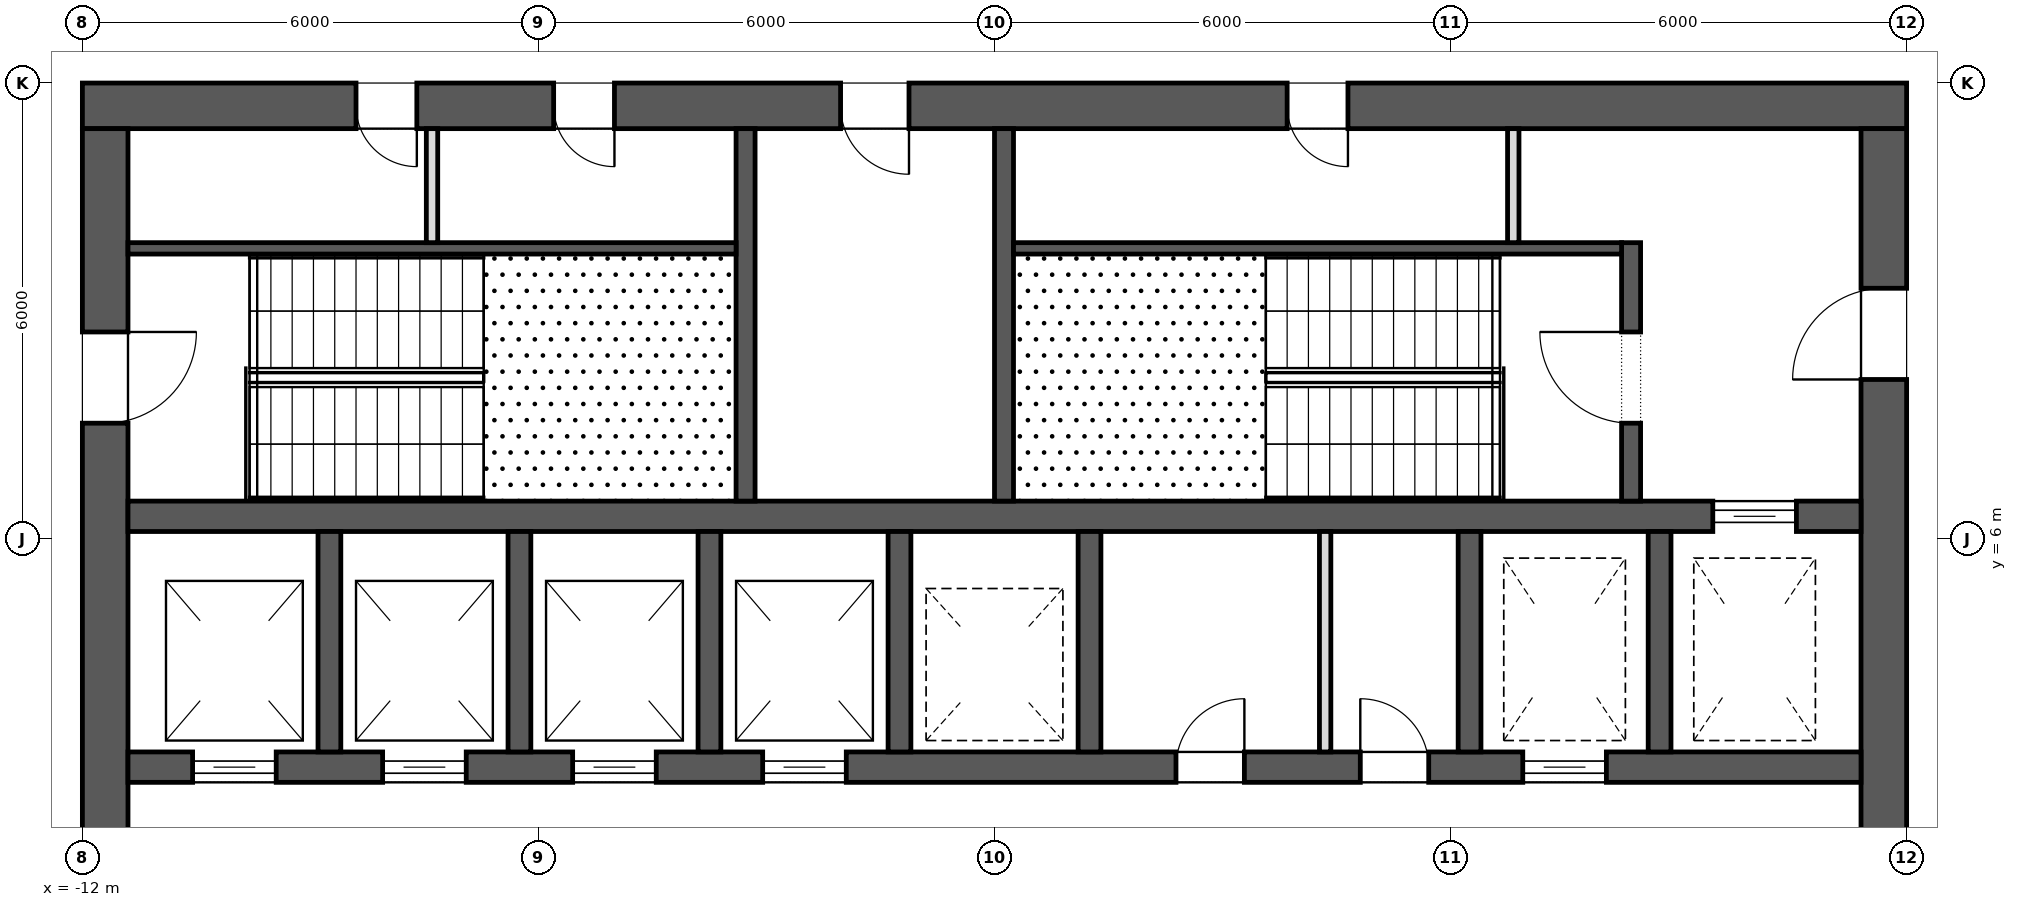
"""IFC4 building model, lengths in metres.
Left out: names, types, materials, properties, quantities, classifications, styles, units other than length and angle.
Written with IfcOpenShell. Run it as: python <this file> out.ifc"""

import sys

from ifc_helpers import new_model, si_unit, direction, frame, frame_2d, origin, place, context, subcontext, project, spatial, rectangle, extrude, element, fill, save


model = new_model("IFC4")
c1 = context("Model", 3, precision=1e-05, world=origin(), true_north=direction((0.0, 1.0)))
c2 = subcontext(c1, "Body", "Model", "MODEL_VIEW")
j1 = project(units=[si_unit("LENGTHUNIT", "METRE"), si_unit("PLANEANGLEUNIT", "RADIAN")], contexts=[c1])
p1 = place(None, origin())
s1 = spatial("IfcSite", under=j1, at=p1, CompositionType="ELEMENT")
p2 = place(p1, origin())
s2 = spatial("IfcBuilding", under=s1, at=p2, CompositionType="ELEMENT")
p3 = place(p2, frame((0.0, 0.0, 238.9)))
s3 = spatial("IfcBuildingStorey", under=s2, at=p3, CompositionType="ELEMENT", Elevation=238.9)
p4 = place(p3, frame((-12.0, 11.7, 0.0), z_axis=(0.0, 0.0, 1.0), x_axis=(1.0, 0.0, 0.0)))
e1 = element("IfcWall", 1, at=p4, inside=s3, PredefinedType="SHEAR", context=c2, shape_type="SweptSolid", body=[
    extrude(rectangle(XDim=24.0, YDim=0.6, at=frame_2d((12.0, 0.0))), origin(), (0.0, 0.0, 1.0), 4.0),
])
p5 = place(p4, frame((9.975, 0.0, 0.0)))
e2 = element("IfcOpeningElement", 2, at=p5, cuts=e1, PredefinedType="OPENING", context=c2, shape_type="SweptSolid", body=[
    extrude(rectangle(XDim=0.9, YDim=2.1, at=frame_2d((0.45, 1.05))), frame((0.0, 0.312, 0.0), z_axis=(0.0, -1.0, 0.0), x_axis=(1.0, 0.0, 0.0)), (0.0, 0.0, 1.0), 0.624),
])
p6 = place(p4, frame((3.6, 0.0, 0.0)))
e3 = element("IfcOpeningElement", 3, at=p6, cuts=e1, PredefinedType="OPENING", context=c2, shape_type="SweptSolid", body=[
    extrude(rectangle(XDim=0.8, YDim=2.1, at=frame_2d((0.4, 1.05))), frame((0.0, 0.312, 0.0), z_axis=(0.0, -1.0, 0.0), x_axis=(1.0, 0.0, 0.0)), (0.0, 0.0, 1.0), 0.624),
])
p7 = place(p4, frame((6.2, 0.0, 0.0)))
e4 = element("IfcOpeningElement", 4, at=p7, cuts=e1, PredefinedType="OPENING", context=c2, shape_type="SweptSolid", body=[
    extrude(rectangle(XDim=0.8, YDim=2.1, at=frame_2d((0.4, 1.05))), frame((0.0, 0.312, 0.0), z_axis=(0.0, -1.0, 0.0), x_axis=(1.0, 0.0, 0.0)), (0.0, 0.0, 1.0), 0.624),
])
p8 = place(p4, frame((15.85, 0.0, 0.0)))
e5 = element("IfcOpeningElement", 5, at=p8, cuts=e1, PredefinedType="OPENING", context=c2, shape_type="SweptSolid", body=[
    extrude(rectangle(XDim=0.8, YDim=2.1, at=frame_2d((0.4, 1.05))), frame((0.0, 0.312, 0.0), z_axis=(0.0, -1.0, 0.0), x_axis=(1.0, 0.0, 0.0)), (0.0, 0.0, 1.0), 0.624),
])
p9 = place(p3, frame((11.7, -11.4, 0.0), z_axis=(0.0, 0.0, 1.0), x_axis=(0.0, 1.0, 0.0)))
e6 = element("IfcWall", 6, at=p9, inside=s3, PredefinedType="SHEAR", context=c2, shape_type="SweptSolid", body=[
    extrude(rectangle(XDim=22.8, YDim=0.6, at=frame_2d((11.4, 0.0))), origin(), (0.0, 0.0, 1.0), 4.0),
])
p10 = place(p9, frame((10.2, 0.0, 0.0)))
e7 = element("IfcOpeningElement", 7, at=p10, cuts=e6, PredefinedType="OPENING", context=c2, shape_type="SweptSolid", body=[
    extrude(rectangle(XDim=2.4, YDim=2.1, at=frame_2d((1.2, 1.05))), frame((0.0, 0.312, 0.0), z_axis=(0.0, -1.0, 0.0), x_axis=(1.0, 0.0, 0.0)), (0.0, 0.0, 1.0), 0.624),
])
p11 = place(p9, frame((19.5, 0.0, 0.0)))
e8 = element("IfcOpeningElement", 8, at=p11, cuts=e6, PredefinedType="OPENING", context=c2, shape_type="SweptSolid", body=[
    extrude(rectangle(XDim=1.2, YDim=2.1, at=frame_2d((0.6, 1.05))), frame((0.0, 0.312, 0.0), z_axis=(0.0, -1.0, 0.0), x_axis=(1.0, 0.0, 0.0)), (0.0, 0.0, 1.0), 0.624),
])
p12 = place(p9, frame((2.1, 0.0, 0.0)))
e9 = element("IfcOpeningElement", 9, at=p12, cuts=e6, PredefinedType="OPENING", context=c2, shape_type="SweptSolid", body=[
    extrude(rectangle(XDim=1.2, YDim=2.1, at=frame_2d((0.6, 1.05))), frame((0.0, 0.312, 0.0), z_axis=(0.0, -1.0, 0.0), x_axis=(1.0, 0.0, 0.0)), (0.0, 0.0, 1.0), 0.624),
])
p13 = place(p3, frame((-11.7, -11.4, 0.0), z_axis=(0.0, 0.0, 1.0), x_axis=(0.0, 1.0, 0.0)))
e10 = element("IfcWall", 10, at=p13, inside=s3, PredefinedType="SHEAR", context=c2, shape_type="SweptSolid", body=[
    extrude(rectangle(XDim=22.8, YDim=0.6, at=frame_2d((11.4, 0.0))), origin(), (0.0, 0.0, 1.0), 4.0),
])
p14 = place(p13, frame((10.2, 0.0, 0.0)))
e11 = element("IfcOpeningElement", 11, at=p14, cuts=e10, PredefinedType="OPENING", context=c2, shape_type="SweptSolid", body=[
    extrude(rectangle(XDim=2.4, YDim=2.1, at=frame_2d((1.2, 1.05))), frame((0.0, 0.312, 0.0), z_axis=(0.0, -1.0, 0.0), x_axis=(1.0, 0.0, 0.0)), (0.0, 0.0, 1.0), 0.624),
])
p15 = place(p13, frame((18.925, 0.0, 0.0)))
e12 = element("IfcOpeningElement", 12, at=p15, cuts=e10, PredefinedType="OPENING", context=c2, shape_type="SweptSolid", body=[
    extrude(rectangle(XDim=1.2, YDim=2.1, at=frame_2d((0.6, 1.05))), frame((0.0, 0.312, 0.0), z_axis=(0.0, -1.0, 0.0), x_axis=(1.0, 0.0, 0.0)), (0.0, 0.0, 1.0), 0.624),
])
p16 = place(p13, frame((2.675, 0.0, 0.0)))
e13 = element("IfcOpeningElement", 13, at=p16, cuts=e10, PredefinedType="OPENING", context=c2, shape_type="SweptSolid", body=[
    extrude(rectangle(XDim=1.2, YDim=2.1, at=frame_2d((0.6, 1.05))), frame((0.0, 0.312, 0.0), z_axis=(0.0, -1.0, 0.0), x_axis=(1.0, 0.0, 0.0)), (0.0, 0.0, 1.0), 0.624),
])
p17 = place(p3, frame((-11.4, 3.0, 0.0), z_axis=(0.0, 0.0, 1.0), x_axis=(1.0, 0.0, 0.0)))
e14 = element("IfcWall", 14, at=p17, inside=s3, PredefinedType="SHEAR", context=c2, shape_type="SweptSolid", body=[
    extrude(rectangle(XDim=22.8, YDim=0.4, at=frame_2d((11.4, 0.0))), origin(), (0.0, 0.0, 1.0), 4.0),
])
p18 = place(p17, frame((0.85, 0.0, 0.0)))
e15 = element("IfcOpeningElement", 15, at=p18, cuts=e14, PredefinedType="OPENING", context=c2, shape_type="SweptSolid", body=[
    extrude(rectangle(XDim=1.1, YDim=2.1, at=frame_2d((0.55, 1.05))), frame((0.0, 0.212, 0.0), z_axis=(0.0, -1.0, 0.0), x_axis=(1.0, 0.0, 0.0)), (0.0, 0.0, 1.0), 0.424),
])
p19 = place(p17, frame((3.35, 0.0, 0.0)))
e16 = element("IfcOpeningElement", 16, at=p19, cuts=e14, PredefinedType="OPENING", context=c2, shape_type="SweptSolid", body=[
    extrude(rectangle(XDim=1.1, YDim=2.1, at=frame_2d((0.55, 1.05))), frame((0.0, 0.212, 0.0), z_axis=(0.0, -1.0, 0.0), x_axis=(1.0, 0.0, 0.0)), (0.0, 0.0, 1.0), 0.424),
])
p20 = place(p17, frame((5.85, 0.0, 0.0)))
e17 = element("IfcOpeningElement", 17, at=p20, cuts=e14, PredefinedType="OPENING", context=c2, shape_type="SweptSolid", body=[
    extrude(rectangle(XDim=1.1, YDim=2.1, at=frame_2d((0.55, 1.05))), frame((0.0, 0.212, 0.0), z_axis=(0.0, -1.0, 0.0), x_axis=(1.0, 0.0, 0.0)), (0.0, 0.0, 1.0), 0.424),
])
p21 = place(p17, frame((8.35, 0.0, 0.0)))
e18 = element("IfcOpeningElement", 18, at=p21, cuts=e14, PredefinedType="OPENING", context=c2, shape_type="SweptSolid", body=[
    extrude(rectangle(XDim=1.1, YDim=2.1, at=frame_2d((0.55, 1.05))), frame((0.0, 0.212, 0.0), z_axis=(0.0, -1.0, 0.0), x_axis=(1.0, 0.0, 0.0)), (0.0, 0.0, 1.0), 0.424),
])
p22 = place(p17, frame((18.35, 0.0, 0.0)))
e19 = element("IfcOpeningElement", 19, at=p22, cuts=e14, PredefinedType="OPENING", context=c2, shape_type="SweptSolid", body=[
    extrude(rectangle(XDim=1.1, YDim=2.1, at=frame_2d((0.55, 1.05))), frame((0.0, 0.212, 0.0), z_axis=(0.0, -1.0, 0.0), x_axis=(1.0, 0.0, 0.0)), (0.0, 0.0, 1.0), 0.424),
])
p23 = place(p17, frame((13.788, 0.0, 0.0)))
e20 = element("IfcOpeningElement", 20, at=p23, cuts=e14, PredefinedType="OPENING", context=c2, shape_type="SweptSolid", body=[
    extrude(rectangle(XDim=0.9, YDim=2.1, at=frame_2d((0.45, 1.05))), frame((0.0, 0.212, 0.0), z_axis=(0.0, -1.0, 0.0), x_axis=(1.0, 0.0, 0.0)), (0.0, 0.0, 1.0), 0.424),
])
p24 = place(p17, frame((16.212, 0.0, 0.0)))
e21 = element("IfcOpeningElement", 21, at=p24, cuts=e14, PredefinedType="OPENING", context=c2, shape_type="SweptSolid", body=[
    extrude(rectangle(XDim=0.9, YDim=2.1, at=frame_2d((0.45, 1.05))), frame((0.0, 0.212, 0.0), z_axis=(0.0, -1.0, 0.0), x_axis=(1.0, 0.0, 0.0)), (0.0, 0.0, 1.0), 0.424),
])
p25 = place(p3, frame((-11.4, 6.3, 0.0), z_axis=(0.0, 0.0, 1.0), x_axis=(1.0, 0.0, 0.0)))
e22 = element("IfcWall", 22, at=p25, inside=s3, PredefinedType="SHEAR", context=c2, shape_type="SweptSolid", body=[
    extrude(rectangle(XDim=22.8, YDim=0.4, at=frame_2d((11.4, 0.0))), origin(), (0.0, 0.0, 1.0), 4.0),
])
p26 = place(p25, frame((20.85, 0.0, 0.0)))
e23 = element("IfcOpeningElement", 23, at=p26, cuts=e22, PredefinedType="OPENING", context=c2, shape_type="SweptSolid", body=[
    extrude(rectangle(XDim=1.1, YDim=2.1, at=frame_2d((0.55, 1.05))), frame((0.0, 0.212, 0.0), z_axis=(0.0, -1.0, 0.0), x_axis=(1.0, 0.0, 0.0)), (0.0, 0.0, 1.0), 0.424),
])
for number, where, z_axis, x_axis in (
    (24, (-8.75, 3.2, 0.0), (0.0, 0.0, 1.0), (0.0, 1.0, 0.0)),
    (25, (-6.25, 3.2, 0.0), (0.0, 0.0, 1.0), (0.0, 1.0, 0.0)),
    (26, (-3.75, 3.2, 0.0), (0.0, 0.0, 1.0), (0.0, 1.0, 0.0)),
    (27, (-1.25, 3.2, 0.0), (0.0, 0.0, 1.0), (0.0, 1.0, 0.0)),
    (28, (1.25, 3.2, 0.0), (0.0, 0.0, 1.0), (0.0, 1.0, 0.0)),
    (29, (6.25, 3.2, 0.0), (0.0, 0.0, 1.0), (0.0, 1.0, 0.0)),
    (30, (8.75, 3.2, 0.0), (0.0, 0.0, 1.0), (0.0, 1.0, 0.0)),
):
    element("IfcWall", number, at=place(p3, frame(where, z_axis=z_axis, x_axis=x_axis)), inside=s3, PredefinedType="SHEAR", context=c2, shape_type="SweptSolid", body=[
        extrude(rectangle(XDim=2.9, YDim=0.3, at=frame_2d((1.45, 0.0))), origin(), (0.0, 0.0, 1.0), 4.0),
    ])
for number, where, z_axis, x_axis in (
    (31, (-3.275, 6.5, 0.0), (0.0, 0.0, 1.0), (0.0, 1.0, 0.0)),
    (32, (0.125, 6.5, 0.0), (0.0, 0.0, 1.0), (0.0, 1.0, 0.0)),
):
    element("IfcWall", number, at=place(p3, frame(where, z_axis=z_axis, x_axis=x_axis)), inside=s3, PredefinedType="SHEAR", context=c2, shape_type="SweptSolid", body=[
        extrude(rectangle(XDim=4.9, YDim=0.25, at=frame_2d((2.45, 0.0))), origin(), (0.0, 0.0, 1.0), 3.7),
    ])
p27 = place(p3, frame((8.375, 6.5, 0.0), z_axis=(0.0, 0.0, 1.0), x_axis=(0.0, 1.0, 0.0)))
e33 = element("IfcWall", 33, at=p27, inside=s3, PredefinedType="SHEAR", context=c2, shape_type="SweptSolid", body=[
    extrude(rectangle(XDim=3.4, YDim=0.25, at=frame_2d((1.7, 0.0))), origin(), (0.0, 0.0, 1.0), 3.7),
])
p28 = place(p27, frame((1.025, 0.0, 0.0)))
e34 = element("IfcOpeningElement", 34, at=p28, cuts=e33, PredefinedType="OPENING", context=c2, shape_type="SweptSolid", body=[
    extrude(rectangle(XDim=1.2, YDim=2.1, at=frame_2d((0.6, 1.05))), frame((0.0, 0.137, 0.0), z_axis=(0.0, -1.0, 0.0), x_axis=(1.0, 0.0, 0.0)), (0.0, 0.0, 1.0), 0.274),
])
for number, where, z_axis, x_axis in (
    (35, (-11.4, 9.825, 0.0), (0.0, 0.0, 1.0), (1.0, 0.0, 0.0)),
    (36, (0.25, 9.825, 0.0), (0.0, 0.0, 1.0), (1.0, 0.0, 0.0)),
):
    element("IfcWall", number, at=place(p3, frame(where, z_axis=z_axis, x_axis=x_axis)), inside=s3, PredefinedType="SHEAR", context=c2, shape_type="SweptSolid", body=[
        extrude(rectangle(XDim=8.0, YDim=0.15, at=frame_2d((4.0, 0.0))), origin(), (0.0, 0.0, 1.0), 3.7),
    ])
for number, where, z_axis, x_axis in (
    (37, (-7.4, 9.9, 0.0), (0.0, 0.0, 1.0), (0.0, 1.0, 0.0)),
    (38, (6.825, 9.9, 0.0), (0.0, 0.0, 1.0), (0.0, 1.0, 0.0)),
):
    element("IfcWall", number, at=place(p3, frame(where, z_axis=z_axis, x_axis=x_axis)), inside=s3, PredefinedType="PARTITIONING", context=c2, shape_type="SweptSolid", body=[
        extrude(rectangle(XDim=1.5, YDim=0.15, at=frame_2d((0.75, 0.0))), origin(), (0.0, 0.0, 1.0), 3.7),
    ])
p29 = place(p3, frame((4.35, 3.2, 0.0), z_axis=(0.0, 0.0, 1.0), x_axis=(0.0, 1.0, 0.0)))
e39 = element("IfcWall", 39, at=p29, inside=s3, PredefinedType="PARTITIONING", context=c2, shape_type="SweptSolid", body=[
    extrude(rectangle(XDim=2.9, YDim=0.15, at=frame_2d((1.45, 0.0))), origin(), (0.0, 0.0, 1.0), 3.7),
])
p30 = place(p26, origin())
e40 = element("IfcDoor", 40, at=p30, inside=s3, OperationType="SLIDING_TO_LEFT", PredefinedType="DOOR", context=c2, shape_type="SweptSolid", body=[
    extrude(rectangle(XDim=1.1, YDim=2.1, at=frame_2d((0.55, 1.05))), frame((0.0, 0.025, 0.0), z_axis=(0.0, -1.0, 0.0), x_axis=(1.0, 0.0, 0.0)), (0.0, 0.0, 1.0), 0.05),
])
fill(e23, e40)
p31 = place(p18, origin())
e41 = element("IfcDoor", 41, at=p31, inside=s3, OperationType="SLIDING_TO_LEFT", PredefinedType="DOOR", context=c2, shape_type="SweptSolid", body=[
    extrude(rectangle(XDim=1.1, YDim=2.1, at=frame_2d((0.55, 1.05))), frame((0.0, 0.025, 0.0), z_axis=(0.0, -1.0, 0.0), x_axis=(1.0, 0.0, 0.0)), (0.0, 0.0, 1.0), 0.05),
])
fill(e15, e41)
p32 = place(p19, origin())
e42 = element("IfcDoor", 42, at=p32, inside=s3, OperationType="SLIDING_TO_LEFT", PredefinedType="DOOR", context=c2, shape_type="SweptSolid", body=[
    extrude(rectangle(XDim=1.1, YDim=2.1, at=frame_2d((0.55, 1.05))), frame((0.0, 0.025, 0.0), z_axis=(0.0, -1.0, 0.0), x_axis=(1.0, 0.0, 0.0)), (0.0, 0.0, 1.0), 0.05),
])
fill(e16, e42)
p33 = place(p20, origin())
e43 = element("IfcDoor", 43, at=p33, inside=s3, OperationType="SLIDING_TO_LEFT", PredefinedType="DOOR", context=c2, shape_type="SweptSolid", body=[
    extrude(rectangle(XDim=1.1, YDim=2.1, at=frame_2d((0.55, 1.05))), frame((0.0, 0.025, 0.0), z_axis=(0.0, -1.0, 0.0), x_axis=(1.0, 0.0, 0.0)), (0.0, 0.0, 1.0), 0.05),
])
fill(e17, e43)
p34 = place(p21, origin())
e44 = element("IfcDoor", 44, at=p34, inside=s3, OperationType="SLIDING_TO_LEFT", PredefinedType="DOOR", context=c2, shape_type="SweptSolid", body=[
    extrude(rectangle(XDim=1.1, YDim=2.1, at=frame_2d((0.55, 1.05))), frame((0.0, 0.025, 0.0), z_axis=(0.0, -1.0, 0.0), x_axis=(1.0, 0.0, 0.0)), (0.0, 0.0, 1.0), 0.05),
])
fill(e18, e44)
p35 = place(p22, origin())
e45 = element("IfcDoor", 45, at=p35, inside=s3, OperationType="SLIDING_TO_LEFT", PredefinedType="DOOR", context=c2, shape_type="SweptSolid", body=[
    extrude(rectangle(XDim=1.1, YDim=2.1, at=frame_2d((0.55, 1.05))), frame((0.0, 0.025, 0.0), z_axis=(0.0, -1.0, 0.0), x_axis=(1.0, 0.0, 0.0)), (0.0, 0.0, 1.0), 0.05),
])
fill(e19, e45)
p36 = place(p15, frame((1.2, 0.0, 0.0), z_axis=(0.0, 0.0, 1.0), x_axis=(-1.0, 0.0, 0.0)))
e46 = element("IfcDoor", 46, at=p36, inside=s3, OperationType="SINGLE_SWING_RIGHT", PredefinedType="DOOR", context=c2, shape_type="SweptSolid", body=[
    extrude(rectangle(XDim=1.2, YDim=2.1, at=frame_2d((0.6, 1.05))), frame((0.0, 0.025, 0.0), z_axis=(0.0, -1.0, 0.0), x_axis=(1.0, 0.0, 0.0)), (0.0, 0.0, 1.0), 0.05),
])
fill(e12, e46)
p37 = place(p28, origin())
e47 = element("IfcDoor", 47, at=p37, inside=s3, OperationType="SINGLE_SWING_LEFT", PredefinedType="DOOR", context=c2, shape_type="SweptSolid", body=[
    extrude(rectangle(XDim=1.2, YDim=2.1, at=frame_2d((0.6, 1.05))), frame((0.0, 0.025, 0.0), z_axis=(0.0, -1.0, 0.0), x_axis=(1.0, 0.0, 0.0)), (0.0, 0.0, 1.0), 0.05),
])
fill(e34, e47)
p38 = place(p11, origin())
e48 = element("IfcDoor", 48, at=p38, inside=s3, OperationType="SINGLE_SWING_RIGHT", PredefinedType="DOOR", context=c2, shape_type="SweptSolid", body=[
    extrude(rectangle(XDim=1.2, YDim=2.1, at=frame_2d((0.6, 1.05))), frame((0.0, 0.025, 0.0), z_axis=(0.0, -1.0, 0.0), x_axis=(1.0, 0.0, 0.0)), (0.0, 0.0, 1.0), 0.05),
])
fill(e8, e48)
p39 = place(p5, frame((0.9, 0.0, 0.0), z_axis=(0.0, 0.0, 1.0), x_axis=(-1.0, 0.0, 0.0)))
e49 = element("IfcDoor", 49, at=p39, inside=s3, OperationType="SINGLE_SWING_RIGHT", PredefinedType="DOOR", context=c2, shape_type="SweptSolid", body=[
    extrude(rectangle(XDim=0.9, YDim=2.1, at=frame_2d((0.45, 1.05))), frame((0.0, 0.025, 0.0), z_axis=(0.0, -1.0, 0.0), x_axis=(1.0, 0.0, 0.0)), (0.0, 0.0, 1.0), 0.05),
])
fill(e2, e49)
p40 = place(p6, frame((0.8, 0.0, 0.0), z_axis=(0.0, 0.0, 1.0), x_axis=(-1.0, 0.0, 0.0)))
e50 = element("IfcDoor", 50, at=p40, inside=s3, OperationType="SINGLE_SWING_RIGHT", PredefinedType="DOOR", context=c2, shape_type="SweptSolid", body=[
    extrude(rectangle(XDim=0.8, YDim=2.1, at=frame_2d((0.4, 1.05))), frame((0.0, 0.025, 0.0), z_axis=(0.0, -1.0, 0.0), x_axis=(1.0, 0.0, 0.0)), (0.0, 0.0, 1.0), 0.05),
])
fill(e3, e50)
p41 = place(p7, frame((0.8, 0.0, 0.0), z_axis=(0.0, 0.0, 1.0), x_axis=(-1.0, 0.0, 0.0)))
e51 = element("IfcDoor", 51, at=p41, inside=s3, OperationType="SINGLE_SWING_RIGHT", PredefinedType="DOOR", context=c2, shape_type="SweptSolid", body=[
    extrude(rectangle(XDim=0.8, YDim=2.1, at=frame_2d((0.4, 1.05))), frame((0.0, 0.025, 0.0), z_axis=(0.0, -1.0, 0.0), x_axis=(1.0, 0.0, 0.0)), (0.0, 0.0, 1.0), 0.05),
])
fill(e4, e51)
p42 = place(p8, frame((0.8, 0.0, 0.0), z_axis=(0.0, 0.0, 1.0), x_axis=(-1.0, 0.0, 0.0)))
e52 = element("IfcDoor", 52, at=p42, inside=s3, OperationType="SINGLE_SWING_RIGHT", PredefinedType="DOOR", context=c2, shape_type="SweptSolid", body=[
    extrude(rectangle(XDim=0.8, YDim=2.1, at=frame_2d((0.4, 1.05))), frame((0.0, 0.025, 0.0), z_axis=(0.0, -1.0, 0.0), x_axis=(1.0, 0.0, 0.0)), (0.0, 0.0, 1.0), 0.05),
])
fill(e5, e52)
p43 = place(p23, origin())
e53 = element("IfcDoor", 53, at=p43, inside=s3, OperationType="SINGLE_SWING_LEFT", PredefinedType="DOOR", context=c2, shape_type="SweptSolid", body=[
    extrude(rectangle(XDim=0.9, YDim=2.1, at=frame_2d((0.45, 1.05))), frame((0.0, 0.025, 0.0), z_axis=(0.0, -1.0, 0.0), x_axis=(1.0, 0.0, 0.0)), (0.0, 0.0, 1.0), 0.05),
])
fill(e20, e53)
p44 = place(p24, origin())
e54 = element("IfcDoor", 54, at=p44, inside=s3, OperationType="SINGLE_SWING_RIGHT", PredefinedType="DOOR", context=c2, shape_type="SweptSolid", body=[
    extrude(rectangle(XDim=0.9, YDim=2.1, at=frame_2d((0.45, 1.05))), frame((0.0, 0.025, 0.0), z_axis=(0.0, -1.0, 0.0), x_axis=(1.0, 0.0, 0.0)), (0.0, 0.0, 1.0), 0.05),
])
fill(e21, e54)
save(model, sys.argv[1])
